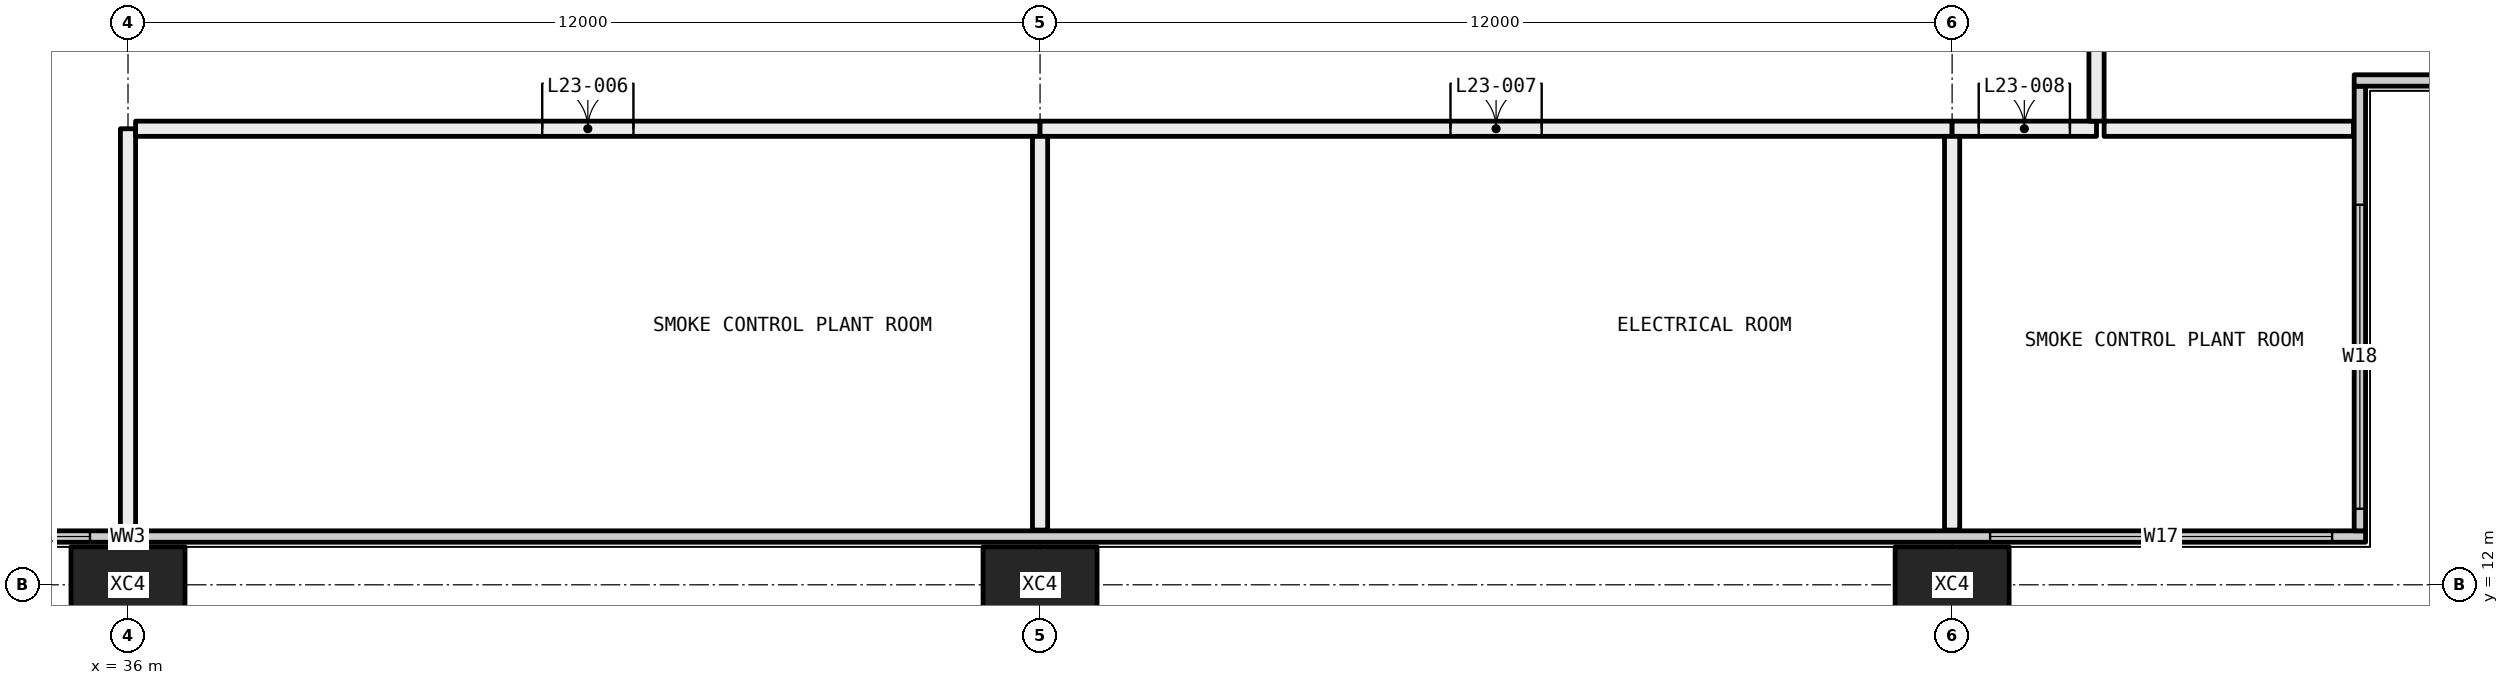
"""IFC4 building model, lengths in metres.
Left out: names, types, materials, properties, quantities, classifications, styles, units other than length and angle.
Written with IfcOpenShell. Run it as: python <this file> out.ifc"""

import sys

from ifc_helpers import new_model, si_unit, direction, frame, frame_2d, origin, origin_2d, place, context, subcontext, project, spatial, rectangle, hollow_rectangle, extrude, element, fill, save


model = new_model("IFC4")
c1 = context("Model", 3, precision=1e-05, world=origin(), true_north=direction((0.0, 1.0)))
c2 = subcontext(c1, "Body", "Model", "MODEL_VIEW")
j1 = project(units=[si_unit("LENGTHUNIT", "METRE"), si_unit("PLANEANGLEUNIT", "RADIAN")], contexts=[c1])
p1 = place(None, origin())
s1 = spatial("IfcSite", under=j1, at=p1, CompositionType="ELEMENT")
p2 = place(p1, origin())
s2 = spatial("IfcBuilding", under=s1, at=p2, CompositionType="ELEMENT")
p3 = place(p2, frame((0.0, 0.0, 92.1)))
s3 = spatial("IfcBuildingStorey", under=s2, at=p3, CompositionType="ELEMENT", Elevation=92.1)
for number, where, z_axis, x_axis in (
    (1, (36.0, 12.0, 0.0), (0.0, 0.0, 1.0), (1.0, 0.0, 0.0)),
    (2, (48.0, 12.0, 0.0), (0.0, 0.0, 1.0), (1.0, 0.0, 0.0)),
    (3, (60.0, 12.0, 0.0), (0.0, 0.0, 1.0), (1.0, 0.0, 0.0)),
):
    element("IfcColumn", number, at=place(p3, frame(where, z_axis=z_axis, x_axis=x_axis)), inside=s3, PredefinedType="COLUMN", context=c2, shape_type="SweptSolid", body=[
        extrude(hollow_rectangle(XDim=1.5, YDim=1.0, WallThickness=0.06, at=origin_2d()), origin(), (0.0, 0.0, 1.0), 4.1),
    ])
p4 = place(p3, frame((6.56, 12.635, 0.0), z_axis=(0.0, 0.0, 1.0), x_axis=(1.0, 0.0, 0.0)))
e4 = element("IfcWall", 4, at=p4, inside=s3, PredefinedType="ELEMENTEDWALL", context=c2, shape_type="SweptSolid", body=[
    extrude(rectangle(XDim=58.88, YDim=0.15, at=frame_2d((29.44, 0.0))), origin(), (0.0, 0.0, 1.0), 4.1),
])
p5 = place(p4, frame((0.44, 0.0, 0.45)))
e5 = element("IfcOpeningElement", 5, at=p5, cuts=e4, PredefinedType="OPENING", context=c2, shape_type="SweptSolid", body=[
    extrude(rectangle(XDim=4.5, YDim=3.6, at=frame_2d((2.25, 1.8))), frame((0.0, 0.085, 0.0), z_axis=(0.0, -1.0, 0.0), x_axis=(1.0, 0.0, 0.0)), (0.0, 0.0, 1.0), 0.17),
])
p6 = place(p4, frame((27.54, 0.0, 0.45)))
e6 = element("IfcOpeningElement", 6, at=p6, cuts=e4, PredefinedType="OPENING", context=c2, shape_type="SweptSolid", body=[
    extrude(rectangle(XDim=1.4, YDim=3.6, at=frame_2d((0.7, 1.8))), frame((0.0, 0.085, 0.0), z_axis=(0.0, -1.0, 0.0), x_axis=(1.0, 0.0, 0.0)), (0.0, 0.0, 1.0), 0.17),
])
p7 = place(p4, frame((25.54, 0.0, 0.0)))
e7 = element("IfcOpeningElement", 7, at=p7, cuts=e4, PredefinedType="OPENING", context=c2, shape_type="SweptSolid", body=[
    extrude(rectangle(XDim=1.8, YDim=2.4, at=frame_2d((0.9, 1.2))), frame((0.0, 0.085, 0.0), z_axis=(0.0, -1.0, 0.0), x_axis=(1.0, 0.0, 0.0)), (0.0, 0.0, 1.0), 0.17),
])
p8 = place(p4, frame((53.94, 0.0, 0.45)))
e8 = element("IfcOpeningElement", 8, at=p8, cuts=e4, PredefinedType="OPENING", context=c2, shape_type="SweptSolid", body=[
    extrude(rectangle(XDim=4.5, YDim=3.6, at=frame_2d((2.25, 1.8))), frame((0.0, 0.085, 0.0), z_axis=(0.0, -1.0, 0.0), x_axis=(1.0, 0.0, 0.0)), (0.0, 0.0, 1.0), 0.17),
])
p9 = place(p3, frame((65.365, 12.71, 0.0), z_axis=(0.0, 0.0, 1.0), x_axis=(0.0, 1.0, 0.0)))
e9 = element("IfcWall", 9, at=p9, inside=s3, PredefinedType="ELEMENTEDWALL", context=c2, shape_type="SweptSolid", body=[
    extrude(rectangle(XDim=5.85, YDim=0.15, at=frame_2d((2.925, 0.0))), origin(), (0.0, 0.0, 1.0), 4.1),
])
p10 = place(p9, frame((0.29, 0.0, 0.45)))
e10 = element("IfcOpeningElement", 10, at=p10, cuts=e9, PredefinedType="OPENING", context=c2, shape_type="SweptSolid", body=[
    extrude(rectangle(XDim=4.0, YDim=3.6, at=frame_2d((2.0, 1.8))), frame((0.0, 0.085, 0.0), z_axis=(0.0, -1.0, 0.0), x_axis=(1.0, 0.0, 0.0)), (0.0, 0.0, 1.0), 0.17),
])
p11 = place(p3, frame((65.29, 18.635, 0.0), z_axis=(0.0, 0.0, 1.0), x_axis=(1.0, 0.0, 0.0)))
e11 = element("IfcWall", 11, at=p11, inside=s3, PredefinedType="ELEMENTEDWALL", context=c2, shape_type="SweptSolid", body=[
    extrude(rectangle(XDim=6.15, YDim=0.15, at=frame_2d((3.075, 0.0))), origin(), (0.0, 0.0, 1.0), 4.1),
])
p12 = place(p11, frame((1.71, 0.0, 0.45)))
e12 = element("IfcOpeningElement", 12, at=p12, cuts=e11, PredefinedType="OPENING", context=c2, shape_type="SweptSolid", body=[
    extrude(rectangle(XDim=4.0, YDim=3.6, at=frame_2d((2.0, 1.8))), frame((0.0, 0.085, 0.0), z_axis=(0.0, -1.0, 0.0), x_axis=(1.0, 0.0, 0.0)), (0.0, 0.0, 1.0), 0.17),
])
p13 = place(p3, frame((36.0, 12.72, 0.0), z_axis=(0.0, 0.0, 1.0), x_axis=(0.0, 1.0, 0.0)))
e13 = element("IfcWall", 13, at=p13, inside=s3, PredefinedType="PARTITIONING", context=c2, shape_type="SweptSolid", body=[
    extrude(rectangle(XDim=5.28, YDim=0.2, at=frame_2d((2.64, 0.0))), origin(), (0.0, 0.0, 1.0), 3.5),
])
p14 = place(p3, frame((36.1, 18.0, 0.0), z_axis=(0.0, 0.0, 1.0), x_axis=(1.0, 0.0, 0.0)))
e14 = element("IfcWall", 14, at=p14, inside=s3, PredefinedType="PARTITIONING", context=c2, shape_type="SweptSolid", body=[
    extrude(rectangle(XDim=11.9, YDim=0.2, at=frame_2d((5.95, 0.0))), origin(), (0.0, 0.0, 1.0), 4.1),
])
p15 = place(p14, frame((5.35, 0.0, 0.0)))
e15 = element("IfcOpeningElement", 15, at=p15, cuts=e14, PredefinedType="OPENING", context=c2, shape_type="SweptSolid", body=[
    extrude(rectangle(XDim=1.2, YDim=2.1, at=frame_2d((0.6, 1.05))), frame((0.0, 0.11, 0.0), z_axis=(0.0, -1.0, 0.0), x_axis=(1.0, 0.0, 0.0)), (0.0, 0.0, 1.0), 0.22),
])
p16 = place(p3, frame((48.0, 18.0, 0.0), z_axis=(0.0, 0.0, 1.0), x_axis=(1.0, 0.0, 0.0)))
e16 = element("IfcWall", 16, at=p16, inside=s3, PredefinedType="PARTITIONING", context=c2, shape_type="SweptSolid", body=[
    extrude(rectangle(XDim=12.0, YDim=0.2, at=frame_2d((6.0, 0.0))), origin(), (0.0, 0.0, 1.0), 4.1),
])
p17 = place(p16, frame((5.4, 0.0, 0.0)))
e17 = element("IfcOpeningElement", 17, at=p17, cuts=e16, PredefinedType="OPENING", context=c2, shape_type="SweptSolid", body=[
    extrude(rectangle(XDim=1.2, YDim=2.1, at=frame_2d((0.6, 1.05))), frame((0.0, 0.11, 0.0), z_axis=(0.0, -1.0, 0.0), x_axis=(1.0, 0.0, 0.0)), (0.0, 0.0, 1.0), 0.22),
])
p18 = place(p3, frame((60.0, 18.0, 0.0), z_axis=(0.0, 0.0, 1.0), x_axis=(1.0, 0.0, 0.0)))
e18 = element("IfcWall", 18, at=p18, inside=s3, PredefinedType="PARTITIONING", context=c2, shape_type="SweptSolid", body=[
    extrude(rectangle(XDim=1.9, YDim=0.2, at=frame_2d((0.95, 0.0))), origin(), (0.0, 0.0, 1.0), 4.1),
])
p19 = place(p18, frame((0.35, 0.0, 0.0)))
e19 = element("IfcOpeningElement", 19, at=p19, cuts=e18, PredefinedType="OPENING", context=c2, shape_type="SweptSolid", body=[
    extrude(rectangle(XDim=1.2, YDim=2.1, at=frame_2d((0.6, 1.05))), frame((0.0, 0.11, 0.0), z_axis=(0.0, -1.0, 0.0), x_axis=(1.0, 0.0, 0.0)), (0.0, 0.0, 1.0), 0.22),
])
p20 = place(p3, frame((61.9, 18.1, 0.0), z_axis=(0.0, 0.0, 1.0), x_axis=(0.0, 1.0, 0.0)))
e20 = element("IfcWall", 20, at=p20, inside=s3, PredefinedType="PARTITIONING", context=c2, shape_type="SweptSolid", body=[
    extrude(rectangle(XDim=5.9, YDim=0.2, at=frame_2d((2.95, 0.0))), origin(), (0.0, 0.0, 1.0), 3.5),
])
p21 = place(p20, frame((2.35, 0.0, 0.0)))
e21 = element("IfcOpeningElement", 21, at=p21, cuts=e20, PredefinedType="OPENING", context=c2, shape_type="SweptSolid", body=[
    extrude(rectangle(XDim=1.2, YDim=2.1, at=frame_2d((0.6, 1.05))), frame((0.0, 0.11, 0.0), z_axis=(0.0, -1.0, 0.0), x_axis=(1.0, 0.0, 0.0)), (0.0, 0.0, 1.0), 0.22),
])
for number, where, z_axis, x_axis in (
    (22, (48.0, 12.72, 0.0), (0.0, 0.0, 1.0), (0.0, 1.0, 0.0)),
    (23, (60.0, 12.72, 0.0), (0.0, 0.0, 1.0), (0.0, 1.0, 0.0)),
):
    element("IfcWall", number, at=place(p3, frame(where, z_axis=z_axis, x_axis=x_axis)), inside=s3, PredefinedType="PARTITIONING", context=c2, shape_type="SweptSolid", body=[
        extrude(rectangle(XDim=5.18, YDim=0.2, at=frame_2d((2.59, 0.0))), origin(), (0.0, 0.0, 1.0), 4.1),
    ])
p22 = place(p3, frame((65.28, 18.0, 0.0), z_axis=(0.0, 0.0, 1.0), x_axis=(-1.0, 0.0, 0.0)))
e24 = element("IfcWall", 24, at=p22, inside=s3, PredefinedType="PARTITIONING", context=c2, shape_type="SweptSolid", body=[
    extrude(rectangle(XDim=3.28, YDim=0.2, at=frame_2d((1.64, 0.0))), origin(), (0.0, 0.0, 1.0), 4.1),
])
p23 = place(p6, origin())
e25 = element("IfcWindow", 25, at=p23, inside=s3, PartitioningType="SINGLE_PANEL", PredefinedType="WINDOW", context=c2, shape_type="SweptSolid", body=[
    extrude(rectangle(XDim=1.4, YDim=3.6, at=frame_2d((0.7, 1.8))), frame((0.0, 0.03, 0.0), z_axis=(0.0, -1.0, 0.0), x_axis=(1.0, 0.0, 0.0)), (0.0, 0.0, 1.0), 0.06),
])
fill(e6, e25)
p24 = place(p8, origin())
e26 = element("IfcWindow", 26, at=p24, inside=s3, PartitioningType="SINGLE_PANEL", PredefinedType="WINDOW", context=c2, shape_type="SweptSolid", body=[
    extrude(rectangle(XDim=4.5, YDim=3.6, at=frame_2d((2.25, 1.8))), frame((0.0, 0.03, 0.0), z_axis=(0.0, -1.0, 0.0), x_axis=(1.0, 0.0, 0.0)), (0.0, 0.0, 1.0), 0.06),
])
fill(e8, e26)
p25 = place(p10, origin())
e27 = element("IfcWindow", 27, at=p25, inside=s3, PartitioningType="SINGLE_PANEL", PredefinedType="WINDOW", context=c2, shape_type="SweptSolid", body=[
    extrude(rectangle(XDim=4.0, YDim=3.6, at=frame_2d((2.0, 1.8))), frame((0.0, 0.03, 0.0), z_axis=(0.0, -1.0, 0.0), x_axis=(1.0, 0.0, 0.0)), (0.0, 0.0, 1.0), 0.06),
])
fill(e10, e27)
p26 = place(p15, origin())
e28 = element("IfcDoor", 28, at=p26, inside=s3, OperationType="DOUBLE_DOOR_SINGLE_SWING", PredefinedType="DOOR", context=c2, shape_type="SweptSolid", body=[
    extrude(rectangle(XDim=1.2, YDim=2.1, at=frame_2d((0.6, 1.05))), frame((0.0, 0.025, 0.0), z_axis=(0.0, -1.0, 0.0), x_axis=(1.0, 0.0, 0.0)), (0.0, 0.0, 1.0), 0.05),
])
fill(e15, e28)
p27 = place(p17, origin())
e29 = element("IfcDoor", 29, at=p27, inside=s3, OperationType="DOUBLE_DOOR_SINGLE_SWING", PredefinedType="DOOR", context=c2, shape_type="SweptSolid", body=[
    extrude(rectangle(XDim=1.2, YDim=2.1, at=frame_2d((0.6, 1.05))), frame((0.0, 0.025, 0.0), z_axis=(0.0, -1.0, 0.0), x_axis=(1.0, 0.0, 0.0)), (0.0, 0.0, 1.0), 0.05),
])
fill(e17, e29)
p28 = place(p19, origin())
e30 = element("IfcDoor", 30, at=p28, inside=s3, OperationType="DOUBLE_DOOR_SINGLE_SWING", PredefinedType="DOOR", context=c2, shape_type="SweptSolid", body=[
    extrude(rectangle(XDim=1.2, YDim=2.1, at=frame_2d((0.6, 1.05))), frame((0.0, 0.025, 0.0), z_axis=(0.0, -1.0, 0.0), x_axis=(1.0, 0.0, 0.0)), (0.0, 0.0, 1.0), 0.05),
])
fill(e19, e30)
save(model, sys.argv[1])
